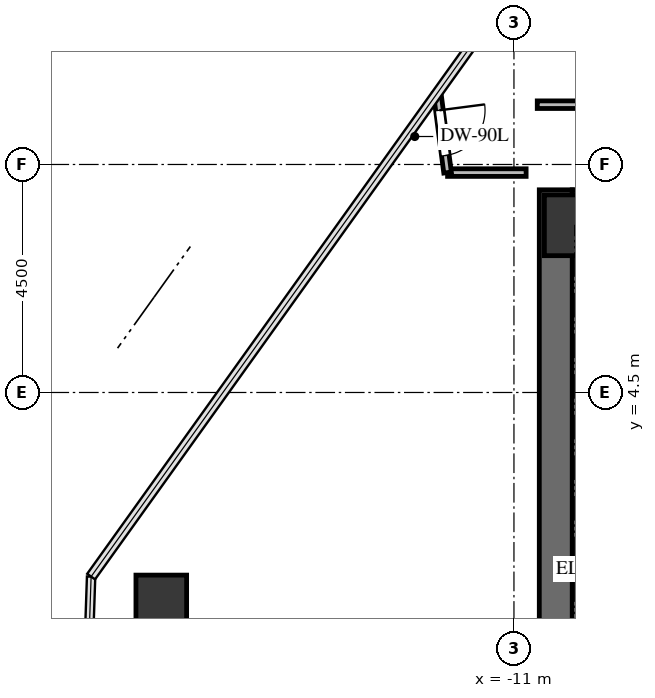
"""IFC4 building model, lengths in metres.
Left out: names, types, materials, properties, quantities, classifications, styles, units other than length and angle.
Written with IfcOpenShell. Run it as: python <this file> out.ifc"""

import sys

from ifc_helpers import new_model, si_unit, direction, frame, frame_2d, origin, origin_2d, place, context, subcontext, project, spatial, rectangle, extrude, source, transform, mapped, element, fill, save


model = new_model("IFC4")
c1 = context("Model", 3, precision=1e-05, world=origin(), true_north=direction((0.0, 1.0)))
c2 = subcontext(c1, "Body", "Model", "MODEL_VIEW")
j1 = project(units=[si_unit("LENGTHUNIT", "METRE"), si_unit("PLANEANGLEUNIT", "RADIAN")], contexts=[c1])
p1 = place(None, origin())
s1 = spatial("IfcSite", under=j1, at=p1, CompositionType="ELEMENT")
p2 = place(p1, origin())
s2 = spatial("IfcBuilding", under=s1, at=p2, CompositionType="ELEMENT")
p3 = place(p2, frame((0.0, 0.0, 209.2)))
s3 = spatial("IfcBuildingStorey", under=s2, at=p3, CompositionType="ELEMENT", Elevation=209.2)
p4 = place(p3, frame((-10.175, -8.5, 0.0), z_axis=(0.0, 0.0, 1.0), x_axis=(0.0, 1.0, 0.0)))
e1 = element("IfcWall", 1, at=p4, inside=s3, PredefinedType="SHEAR", context=c2, shape_type="SweptSolid", body=[
    extrude(rectangle(XDim=17.0, YDim=0.65, at=frame_2d((8.5, 0.0))), origin(), (0.0, 0.0, 1.0), 4.2),
])
p5 = place(p3, frame((-9.85, 8.175, 0.0), z_axis=(0.0, 0.0, 1.0), x_axis=(1.0, 0.0, 0.0)))
e2 = element("IfcWall", 2, at=p5, inside=s3, PredefinedType="SHEAR", context=c2, shape_type="SweptSolid", body=[
    extrude(rectangle(XDim=19.7, YDim=0.65, at=frame_2d((9.85, 0.0))), origin(), (0.0, 0.0, 1.0), 4.2),
])
m1 = source(origin(), c2, "Body", "SweptSolid", [
    extrude(rectangle(XDim=1.2, YDim=1.2, at=origin_2d()), origin(), (0.0, 0.0, 1.0), 4.14),
])
p6 = place(p3, frame((-9.8, 7.8, -0.24), z_axis=(0.0, 0.0, 1.0), x_axis=(1.0, 0.0, 0.0)))
e3 = element("IfcColumn", 3, at=p6, inside=s3, PredefinedType="COLUMN", context=c2, shape_type="MappedRepresentation", body=[
    mapped(m1, transform((0.0, 0.0, 0.0), x_axis=(1.0, 0.0, 0.0), y_axis=(0.0, 1.0, 0.0), z_axis=(0.0, 0.0, 1.0), scale=1.0)),
])
m2 = source(origin(), c2, "Body", "SweptSolid", [
    extrude(rectangle(XDim=1.0, YDim=1.0, at=origin_2d()), origin(), (0.0, 0.0, 1.0), 4.14),
])
p7 = place(p3, frame((-17.96, 0.396, -0.24), z_axis=(0.0, 0.0, 1.0), x_axis=(1.0, 0.0, 0.0)))
e4 = element("IfcColumn", 4, at=p7, inside=s3, PredefinedType="COLUMN", context=c2, shape_type="MappedRepresentation", body=[
    mapped(m2, transform((0.0, 0.0, 0.0), x_axis=(1.0, 0.0, 0.0), y_axis=(0.0, 1.0, 0.0), z_axis=(0.0, 0.0, 1.0), scale=1.0)),
])
p8 = place(p3, frame((-4.96, 10.18, 0.0), z_axis=(0.0, 0.0, 1.0), x_axis=(-1.0, 0.0, 0.0)))
e5 = element("IfcWall", 5, at=p8, inside=s3, PredefinedType="PARTITIONING", context=c2, shape_type="SweptSolid", body=[
    extrude(rectangle(XDim=5.58, YDim=0.15, at=frame_2d((2.79, 0.0))), origin(), (0.0, 0.0, 1.0), 2.47),
])
p9 = place(p8, frame((2.315, 0.0, 0.0)))
e6 = element("IfcOpeningElement", 6, at=p9, cuts=e5, PredefinedType="OPENING", context=c2, shape_type="SweptSolid", body=[
    extrude(rectangle(XDim=0.95, YDim=2.1, at=frame_2d((0.475, 1.05))), frame((0.0, 0.085, 0.0), z_axis=(0.0, -1.0, 0.0), x_axis=(1.0, 0.0, 0.0)), (0.0, 0.0, 1.0), 0.17),
])
p10 = place(p3, frame((-12.31, 8.84, 0.0), z_axis=(0.0, 0.0, 1.0), x_axis=(1.0, 0.0, 0.0)))
e7 = element("IfcWall", 7, at=p10, inside=s3, PredefinedType="PARTITIONING", context=c2, shape_type="SweptSolid", body=[
    extrude(rectangle(XDim=1.55, YDim=0.15, at=frame_2d((0.775, 0.0))), origin(), (0.0, 0.0, 1.0), 2.47),
])
p11 = place(p3, frame((-12.514, 10.406, 0.0), z_axis=(0.0, 0.0, 1.0), x_axis=(0.129378833178, -0.991595238757, 0.0)))
e8 = element("IfcWall", 8, at=p11, inside=s3, PredefinedType="PARTITIONING", context=c2, shape_type="SweptSolid", body=[
    extrude(rectangle(XDim=1.579, YDim=0.15, at=frame_2d((0.79, 0.0))), origin(), (0.0, 0.0, 1.0), 2.47),
])
p12 = place(p11, frame((0.34, 0.0, 0.0)))
e9 = element("IfcOpeningElement", 9, at=p12, cuts=e8, PredefinedType="OPENING", context=c2, shape_type="SweptSolid", body=[
    extrude(rectangle(XDim=0.9, YDim=2.05, at=frame_2d((0.45, 1.025))), frame((0.0, 0.085, 0.0), z_axis=(0.0, -1.0, 0.0), x_axis=(1.0, 0.0, 0.0)), (0.0, 0.0, 1.0), 0.17),
])
m3 = source(origin(), c2, "Body", "SweptSolid", [
    extrude(rectangle(XDim=0.9, YDim=2.05, at=frame_2d((0.45, 1.025))), frame((0.0, 0.025, 0.0), z_axis=(0.0, -1.0, 0.0), x_axis=(1.0, 0.0, 0.0)), (0.0, 0.0, 1.0), 0.05),
])
p13 = place(p12, origin())
e10 = element("IfcDoor", 10, at=p13, inside=s3, OperationType="SINGLE_SWING_LEFT", PredefinedType="DOOR", context=c2, shape_type="MappedRepresentation", body=[
    mapped(m3, transform((0.0, 0.0, 0.0), x_axis=(1.0, 0.0, 0.0), y_axis=(0.0, 1.0, 0.0), z_axis=(0.0, 0.0, 1.0), scale=1.0)),
])
fill(e9, e10)
save(model, sys.argv[1])
